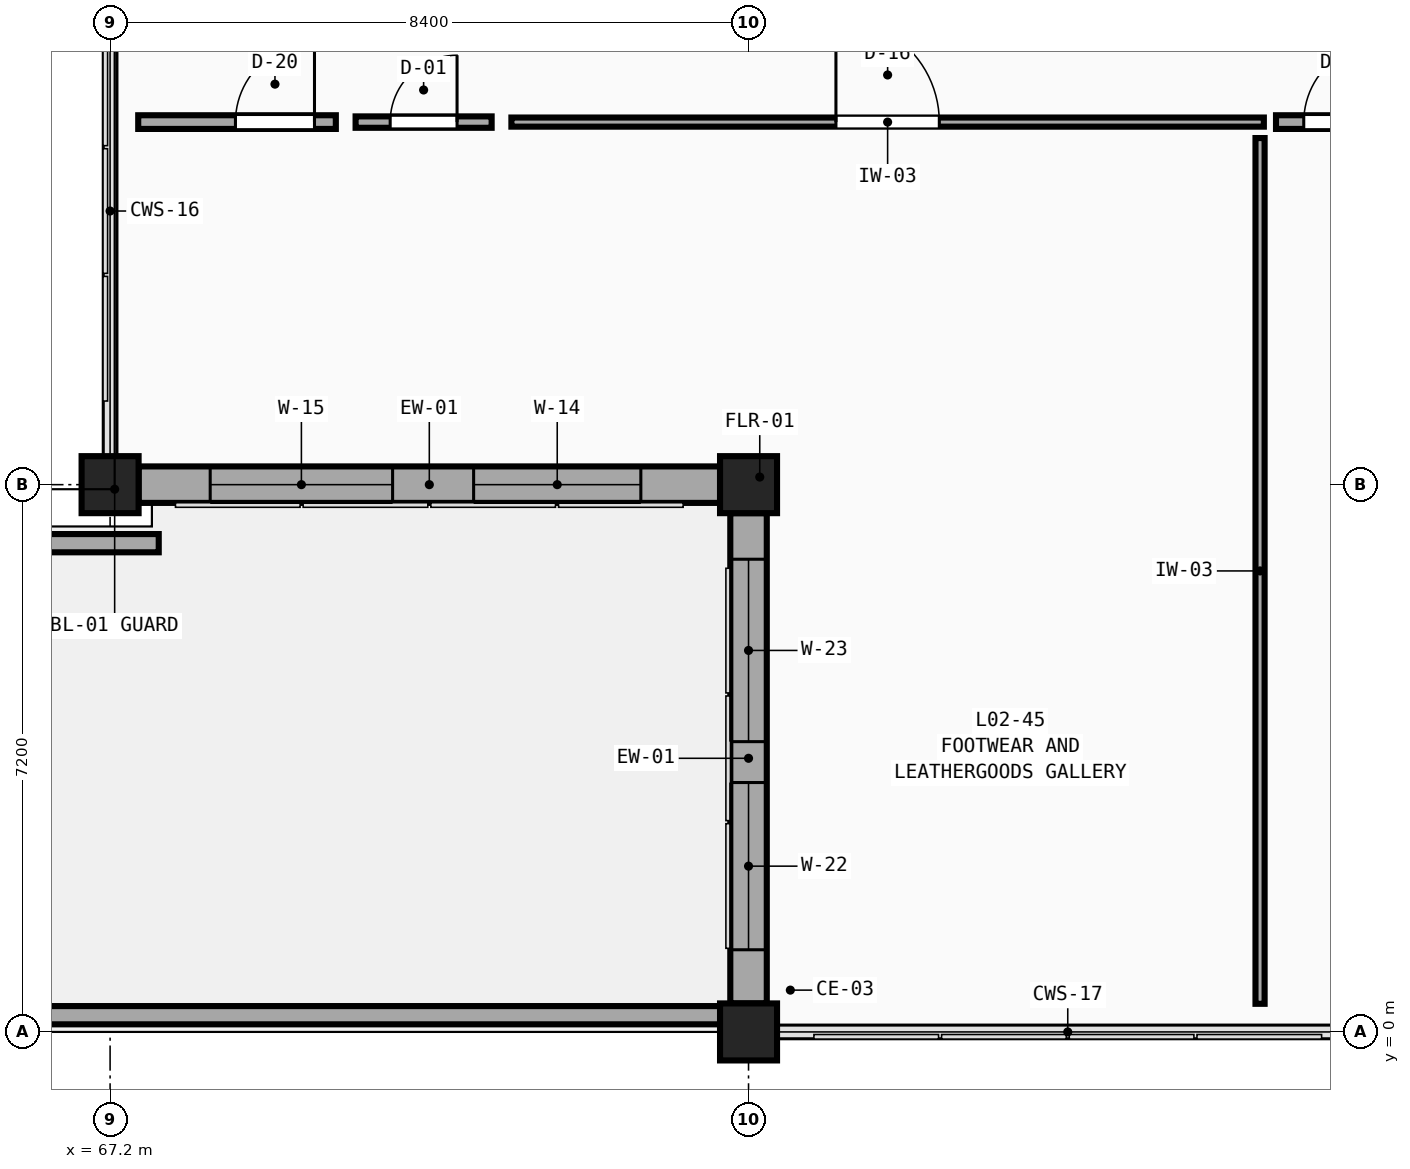
"""IFC4 building model, lengths in metres.
Left out: names, types, materials, properties, quantities, classifications, styles, units other than length and angle.
Written with IfcOpenShell. Run it as: python <this file> out.ifc"""

import sys

from ifc_helpers import new_model, si_unit, direction, frame, frame_2d, origin, origin_2d, place, context, subcontext, project, spatial, rectangle, extrude, element, fill, save


model = new_model("IFC4")
c1 = context("Model", 3, precision=1e-05, world=origin(), true_north=direction((0.0, 1.0)))
c2 = subcontext(c1, "Body", "Model", "MODEL_VIEW")
j1 = project(units=[si_unit("LENGTHUNIT", "METRE"), si_unit("PLANEANGLEUNIT", "RADIAN")], contexts=[c1])
p1 = place(None, origin())
s1 = spatial("IfcSite", under=j1, at=p1, CompositionType="ELEMENT")
p2 = place(p1, origin())
s2 = spatial("IfcBuilding", under=s1, at=p2, CompositionType="ELEMENT")
p3 = place(p2, frame((0.0, 0.0, 9.9)))
s3 = spatial("IfcBuildingStorey", under=s2, at=p3, CompositionType="ELEMENT", Elevation=9.9)
for number, where, z_axis, x_axis in (
    (1, (67.2, 7.2, 0.0), (0.0, 0.0, 1.0), (1.0, 0.0, 0.0)),
    (2, (75.6, 0.0, 0.0), (0.0, 0.0, 1.0), (1.0, 0.0, 0.0)),
    (3, (75.6, 7.2, 0.0), (0.0, 0.0, 1.0), (1.0, 0.0, 0.0)),
):
    element("IfcColumn", number, at=place(p3, frame(where, z_axis=z_axis, x_axis=x_axis)), inside=s3, PredefinedType="COLUMN", context=c2, shape_type="SweptSolid", body=[
        extrude(rectangle(XDim=0.75, YDim=0.75, at=origin_2d()), origin(), (0.0, 0.0, 1.0), 4.5),
    ])
p4 = place(p3, frame((75.225, 7.2, 0.0), z_axis=(0.0, 0.0, 1.0), x_axis=(-1.0, 0.0, 0.0)))
e4 = element("IfcWall", 4, at=p4, inside=s3, PredefinedType="SOLIDWALL", context=c2, shape_type="SweptSolid", body=[
    extrude(rectangle(XDim=7.65, YDim=0.48, at=frame_2d((3.825, 0.0))), origin(), (0.0, 0.0, 1.0), 3.63),
])
p5 = place(p4, frame((1.042, 0.0, 0.75)))
e5 = element("IfcOpeningElement", 5, at=p5, cuts=e4, PredefinedType="OPENING", context=c2, shape_type="SweptSolid", body=[
    extrude(rectangle(XDim=2.2, YDim=2.08, at=frame_2d((1.1, 1.04))), frame((0.0, 0.26, 0.0), z_axis=(0.0, -1.0, 0.0), x_axis=(1.0, 0.0, 0.0)), (0.0, 0.0, 1.0), 0.52),
])
p6 = place(p4, frame((4.308, 0.0, 0.75)))
e6 = element("IfcOpeningElement", 6, at=p6, cuts=e4, PredefinedType="OPENING", context=c2, shape_type="SweptSolid", body=[
    extrude(rectangle(XDim=2.4, YDim=2.08, at=frame_2d((1.2, 1.04))), frame((0.0, 0.26, 0.0), z_axis=(0.0, -1.0, 0.0), x_axis=(1.0, 0.0, 0.0)), (0.0, 0.0, 1.0), 0.52),
])
p7 = place(p3, frame((75.6, 0.375, 0.0), z_axis=(0.0, 0.0, 1.0), x_axis=(0.0, 1.0, 0.0)))
e7 = element("IfcWall", 7, at=p7, inside=s3, PredefinedType="SOLIDWALL", context=c2, shape_type="SweptSolid", body=[
    extrude(rectangle(XDim=6.45, YDim=0.48, at=frame_2d((3.225, 0.0))), origin(), (0.0, 0.0, 1.0), 3.63),
])
p8 = place(p7, frame((0.706, 0.0, 0.75)))
e8 = element("IfcOpeningElement", 8, at=p8, cuts=e7, PredefinedType="OPENING", context=c2, shape_type="SweptSolid", body=[
    extrude(rectangle(XDim=2.2, YDim=2.26, at=frame_2d((1.1, 1.13))), frame((0.0, 0.26, 0.0), z_axis=(0.0, -1.0, 0.0), x_axis=(1.0, 0.0, 0.0)), (0.0, 0.0, 1.0), 0.52),
])
p9 = place(p7, frame((3.444, 0.0, 0.75)))
e9 = element("IfcOpeningElement", 9, at=p9, cuts=e7, PredefinedType="OPENING", context=c2, shape_type="SweptSolid", body=[
    extrude(rectangle(XDim=2.4, YDim=2.26, at=frame_2d((1.2, 1.13))), frame((0.0, 0.26, 0.0), z_axis=(0.0, -1.0, 0.0), x_axis=(1.0, 0.0, 0.0)), (0.0, 0.0, 1.0), 0.52),
])
p10 = place(p3, frame((75.25, 0.22, 0.0), z_axis=(0.0, 0.0, 1.0), x_axis=(-1.0, 0.0, 0.0)))
e10 = element("IfcWall", 10, at=p10, inside=s3, PredefinedType="PARAPET", context=c2, shape_type="SweptSolid", body=[
    extrude(rectangle(XDim=24.5, YDim=0.24, at=frame_2d((12.25, 0.0))), origin(), (0.0, 0.0, 1.0), 1.15),
])
p11 = place(p3, frame((58.16, 6.43, 0.0), z_axis=(0.0, 0.0, 1.0), x_axis=(1.0, 0.0, 0.0)))
e11 = element("IfcWall", 11, at=p11, inside=s3, PredefinedType="PARAPET", context=c2, shape_type="SweptSolid", body=[
    extrude(rectangle(XDim=9.68, YDim=0.24, at=frame_2d((4.84, 0.0))), origin(), (0.0, 0.0, 1.0), 1.15),
])
p12 = place(p3, frame((72.48, 11.97, 0.0), z_axis=(0.0, 0.0, 1.0), x_axis=(1.0, 0.0, 0.0)))
e12 = element("IfcWall", 12, at=p12, inside=s3, PredefinedType="PARTITIONING", context=c2, shape_type="SweptSolid", body=[
    extrude(rectangle(XDim=9.9, YDim=0.12, at=frame_2d((4.95, 0.0))), origin(), (0.0, 0.0, 1.0), 4.18),
])
p13 = place(p12, frame((4.27, 0.0, 0.0)))
e13 = element("IfcOpeningElement", 13, at=p13, cuts=e12, PredefinedType="OPENING", context=c2, shape_type="SweptSolid", body=[
    extrude(rectangle(XDim=1.36, YDim=2.21, at=frame_2d((0.68, 1.105))), frame((0.0, 0.08, 0.0), z_axis=(0.0, -1.0, 0.0), x_axis=(1.0, 0.0, 0.0)), (0.0, 0.0, 1.0), 0.16),
])
p14 = place(p3, frame((67.57, 11.97, 0.0), z_axis=(0.0, 0.0, 1.0), x_axis=(1.0, 0.0, 0.0)))
e14 = element("IfcWall", 14, at=p14, inside=s3, PredefinedType="PARTITIONING", context=c2, shape_type="SweptSolid", body=[
    extrude(rectangle(XDim=2.6, YDim=0.18, at=frame_2d((1.3, 0.0))), origin(), (0.0, 0.0, 1.0), 4.18),
])
p15 = place(p14, frame((1.279, 0.0, 0.0)))
e15 = element("IfcOpeningElement", 15, at=p15, cuts=e14, PredefinedType="OPENING", context=c2, shape_type="SweptSolid", body=[
    extrude(rectangle(XDim=1.04, YDim=2.29, at=frame_2d((0.52, 1.145))), frame((0.0, 0.11, 0.0), z_axis=(0.0, -1.0, 0.0), x_axis=(1.0, 0.0, 0.0)), (0.0, 0.0, 1.0), 0.22),
])
p16 = place(p3, frame((70.43, 11.97, 0.0), z_axis=(0.0, 0.0, 1.0), x_axis=(1.0, 0.0, 0.0)))
e16 = element("IfcWall", 16, at=p16, inside=s3, PredefinedType="PARTITIONING", context=c2, shape_type="SweptSolid", body=[
    extrude(rectangle(XDim=1.79, YDim=0.15, at=frame_2d((0.895, 0.0))), origin(), (0.0, 0.0, 1.0), 4.18),
])
p17 = place(p16, frame((0.455, 0.0, 0.0)))
e17 = element("IfcOpeningElement", 17, at=p17, cuts=e16, PredefinedType="OPENING", context=c2, shape_type="SweptSolid", body=[
    extrude(rectangle(XDim=0.88, YDim=2.05, at=frame_2d((0.44, 1.025))), frame((0.0, 0.095, 0.0), z_axis=(0.0, -1.0, 0.0), x_axis=(1.0, 0.0, 0.0)), (0.0, 0.0, 1.0), 0.19),
])
p18 = place(p3, frame((82.54, 11.97, 0.0), z_axis=(0.0, 0.0, 1.0), x_axis=(1.0, 0.0, 0.0)))
e18 = element("IfcWall", 18, at=p18, inside=s3, PredefinedType="PARTITIONING", context=c2, shape_type="SweptSolid", body=[
    extrude(rectangle(XDim=1.77, YDim=0.18, at=frame_2d((0.885, 0.0))), origin(), (0.0, 0.0, 1.0), 4.18),
])
p19 = place(p18, frame((0.365, 0.0, 0.0)))
e19 = element("IfcOpeningElement", 19, at=p19, cuts=e18, PredefinedType="OPENING", context=c2, shape_type="SweptSolid", body=[
    extrude(rectangle(XDim=1.04, YDim=2.45, at=frame_2d((0.52, 1.225))), frame((0.0, 0.11, 0.0), z_axis=(0.0, -1.0, 0.0), x_axis=(1.0, 0.0, 0.0)), (0.0, 0.0, 1.0), 0.22),
])
p20 = place(p3, frame((82.33, 0.37, 0.0), z_axis=(0.0, 0.0, 1.0), x_axis=(0.0, 1.0, 0.0)))
e20 = element("IfcWall", 20, at=p20, inside=s3, PredefinedType="PARTITIONING", context=c2, shape_type="SweptSolid", body=[
    extrude(rectangle(XDim=11.39, YDim=0.12, at=frame_2d((5.695, 0.0))), origin(), (0.0, 0.0, 1.0), 4.18),
])
p21 = place(p5, origin())
e21 = element("IfcWindow", 21, at=p21, inside=s3, PartitioningType="TRIPLE_PANEL_VERTICAL", PredefinedType="WINDOW", context=c2, shape_type="SweptSolid", body=[
    extrude(rectangle(XDim=2.2, YDim=2.08, at=frame_2d((1.1, 1.04))), frame((0.0, 0.03, 0.0), z_axis=(0.0, -1.0, 0.0), x_axis=(1.0, 0.0, 0.0)), (0.0, 0.0, 1.0), 0.06),
])
fill(e5, e21)
p22 = place(p6, origin())
e22 = element("IfcWindow", 22, at=p22, inside=s3, PartitioningType="TRIPLE_PANEL_VERTICAL", PredefinedType="WINDOW", context=c2, shape_type="SweptSolid", body=[
    extrude(rectangle(XDim=2.4, YDim=2.08, at=frame_2d((1.2, 1.04))), frame((0.0, 0.03, 0.0), z_axis=(0.0, -1.0, 0.0), x_axis=(1.0, 0.0, 0.0)), (0.0, 0.0, 1.0), 0.06),
])
fill(e6, e22)
p23 = place(p8, origin())
e23 = element("IfcWindow", 23, at=p23, inside=s3, PartitioningType="TRIPLE_PANEL_VERTICAL", PredefinedType="WINDOW", context=c2, shape_type="SweptSolid", body=[
    extrude(rectangle(XDim=2.2, YDim=2.26, at=frame_2d((1.1, 1.13))), frame((0.0, 0.03, 0.0), z_axis=(0.0, -1.0, 0.0), x_axis=(1.0, 0.0, 0.0)), (0.0, 0.0, 1.0), 0.06),
])
fill(e8, e23)
p24 = place(p9, origin())
e24 = element("IfcWindow", 24, at=p24, inside=s3, PartitioningType="TRIPLE_PANEL_VERTICAL", PredefinedType="WINDOW", context=c2, shape_type="SweptSolid", body=[
    extrude(rectangle(XDim=2.4, YDim=2.26, at=frame_2d((1.2, 1.13))), frame((0.0, 0.03, 0.0), z_axis=(0.0, -1.0, 0.0), x_axis=(1.0, 0.0, 0.0)), (0.0, 0.0, 1.0), 0.06),
])
fill(e9, e24)
p25 = place(p13, origin())
e25 = element("IfcDoor", 25, at=p25, inside=s3, OperationType="SINGLE_SWING_LEFT", PredefinedType="DOOR", context=c2, shape_type="SweptSolid", body=[
    extrude(rectangle(XDim=1.36, YDim=2.21, at=frame_2d((0.68, 1.105))), frame((0.0, 0.025, 0.0), z_axis=(0.0, -1.0, 0.0), x_axis=(1.0, 0.0, 0.0)), (0.0, 0.0, 1.0), 0.05),
])
fill(e13, e25)
p26 = place(p15, origin())
e26 = element("IfcDoor", 26, at=p26, inside=s3, OperationType="SINGLE_SWING_RIGHT", PredefinedType="DOOR", context=c2, shape_type="SweptSolid", body=[
    extrude(rectangle(XDim=1.04, YDim=2.29, at=frame_2d((0.52, 1.145))), frame((0.0, 0.025, 0.0), z_axis=(0.0, -1.0, 0.0), x_axis=(1.0, 0.0, 0.0)), (0.0, 0.0, 1.0), 0.05),
])
fill(e15, e26)
p27 = place(p17, origin())
e27 = element("IfcDoor", 27, at=p27, inside=s3, OperationType="SINGLE_SWING_RIGHT", PredefinedType="DOOR", context=c2, shape_type="SweptSolid", body=[
    extrude(rectangle(XDim=0.88, YDim=2.05, at=frame_2d((0.44, 1.025))), frame((0.0, 0.025, 0.0), z_axis=(0.0, -1.0, 0.0), x_axis=(1.0, 0.0, 0.0)), (0.0, 0.0, 1.0), 0.05),
])
fill(e17, e27)
p28 = place(p19, origin())
e28 = element("IfcDoor", 28, at=p28, inside=s3, OperationType="SINGLE_SWING_RIGHT", PredefinedType="DOOR", context=c2, shape_type="SweptSolid", body=[
    extrude(rectangle(XDim=1.04, YDim=2.45, at=frame_2d((0.52, 1.225))), frame((0.0, 0.025, 0.0), z_axis=(0.0, -1.0, 0.0), x_axis=(1.0, 0.0, 0.0)), (0.0, 0.0, 1.0), 0.05),
])
fill(e19, e28)
save(model, sys.argv[1])
